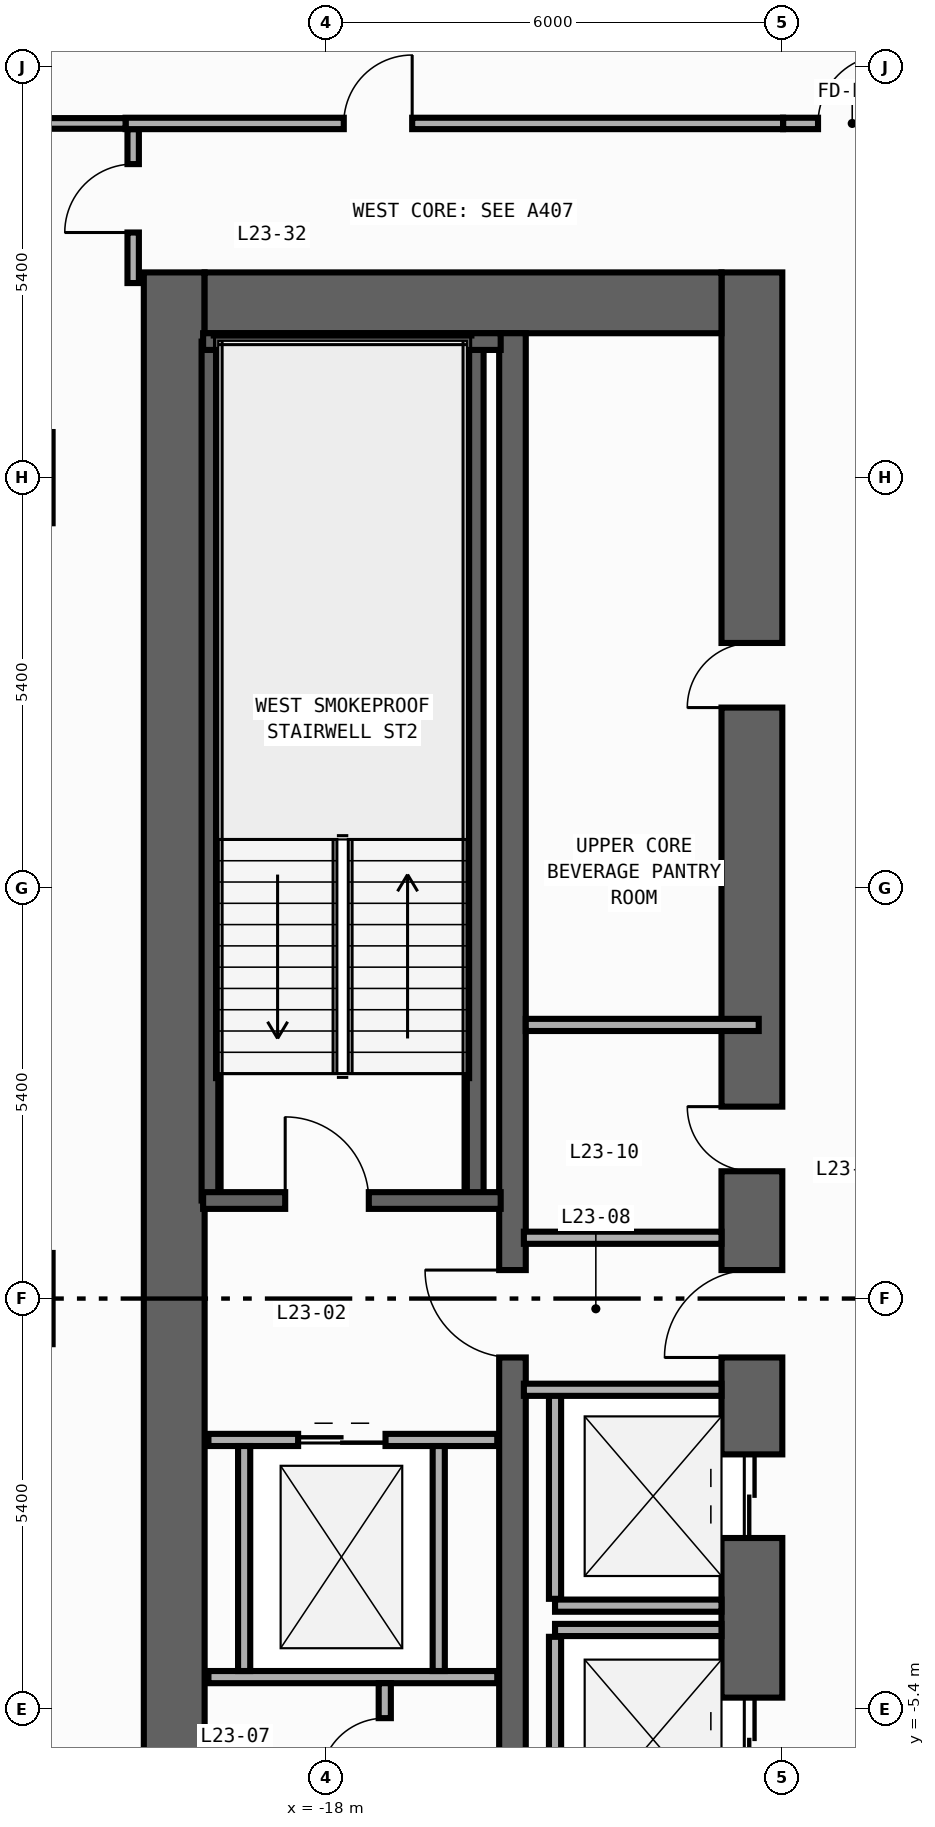
"""IFC4 building model, lengths in metres.
Left out: names, types, materials, properties, quantities, classifications, styles, units other than length and angle.
Written with IfcOpenShell. Run it as: python <this file> out.ifc"""

import sys

from ifc_helpers import new_model, si_unit, direction, frame, frame_2d, origin, origin_2d, place, context, subcontext, project, spatial, rectangle, extrude, element, fill, save


model = new_model("IFC4")
c1 = context("Model", 3, precision=1e-05, world=origin(), true_north=direction((0.0, 1.0)))
c2 = subcontext(c1, "Body", "Model", "MODEL_VIEW")
j1 = project(units=[si_unit("LENGTHUNIT", "METRE"), si_unit("PLANEANGLEUNIT", "RADIAN")], contexts=[c1])
p1 = place(None, origin())
s1 = spatial("IfcSite", under=j1, at=p1, CompositionType="ELEMENT")
p2 = place(p1, origin())
s2 = spatial("IfcBuilding", under=s1, at=p2, CompositionType="ELEMENT")
p3 = place(p2, frame((0.0, 0.0, 101.6)))
s3 = spatial("IfcBuildingStorey", under=s2, at=p3, CompositionType="ELEMENT", Elevation=101.6)
p4 = place(p3, frame((-20.0, -13.5, 0.0), z_axis=(0.0, 0.0, 1.0), x_axis=(0.0, 1.0, 0.0)))
e1 = element("IfcWall", 1, at=p4, inside=s3, PredefinedType="SHEAR", context=c2, shape_type="SweptSolid", body=[
    extrude(rectangle(XDim=27.0, YDim=0.8, at=frame_2d((13.5, 0.0))), origin(), (0.0, 0.0, 1.0), 3.94),
])
p5 = place(p3, frame((-12.4, -13.5, 0.0), z_axis=(0.0, 0.0, 1.0), x_axis=(0.0, 1.0, 0.0)))
e2 = element("IfcWall", 2, at=p5, inside=s3, PredefinedType="SHEAR", context=c2, shape_type="SweptSolid", body=[
    extrude(rectangle(XDim=27.0, YDim=0.8, at=frame_2d((13.5, 0.0))), origin(), (0.0, 0.0, 1.0), 3.94),
])
p6 = place(p5, frame((10.35, 0.0, 0.0)))
e3 = element("IfcOpeningElement", 3, at=p6, cuts=e2, PredefinedType="OPENING", context=c2, shape_type="SweptSolid", body=[
    extrude(rectangle(XDim=1.1, YDim=2.2, at=frame_2d((0.55, 1.1))), frame((0.0, 0.41, 0.0), z_axis=(0.0, -1.0, 0.0), x_axis=(1.0, 0.0, 0.0)), (0.0, 0.0, 1.0), 0.82),
])
p7 = place(p5, frame((7.15, 0.0, 0.0)))
e4 = element("IfcOpeningElement", 4, at=p7, cuts=e2, PredefinedType="OPENING", context=c2, shape_type="SweptSolid", body=[
    extrude(rectangle(XDim=1.1, YDim=2.2, at=frame_2d((0.55, 1.1))), frame((0.0, 0.41, 0.0), z_axis=(0.0, -1.0, 0.0), x_axis=(1.0, 0.0, 0.0)), (0.0, 0.0, 1.0), 0.82),
])
p8 = place(p5, frame((3.95, 0.0, 0.0)))
e5 = element("IfcOpeningElement", 5, at=p8, cuts=e2, PredefinedType="OPENING", context=c2, shape_type="SweptSolid", body=[
    extrude(rectangle(XDim=1.1, YDim=2.2, at=frame_2d((0.55, 1.1))), frame((0.0, 0.41, 0.0), z_axis=(0.0, -1.0, 0.0), x_axis=(1.0, 0.0, 0.0)), (0.0, 0.0, 1.0), 0.82),
])
p9 = place(p5, frame((15.175, 0.0, 0.0)))
e6 = element("IfcOpeningElement", 6, at=p9, cuts=e2, PredefinedType="OPENING", context=c2, shape_type="SweptSolid", body=[
    extrude(rectangle(XDim=0.85, YDim=2.1, at=frame_2d((0.425, 1.05))), frame((0.0, 0.41, 0.0), z_axis=(0.0, -1.0, 0.0), x_axis=(1.0, 0.0, 0.0)), (0.0, 0.0, 1.0), 0.82),
])
p10 = place(p5, frame((21.275, 0.0, 0.0)))
e7 = element("IfcOpeningElement", 7, at=p10, cuts=e2, PredefinedType="OPENING", context=c2, shape_type="SweptSolid", body=[
    extrude(rectangle(XDim=0.85, YDim=2.1, at=frame_2d((0.425, 1.05))), frame((0.0, 0.41, 0.0), z_axis=(0.0, -1.0, 0.0), x_axis=(1.0, 0.0, 0.0)), (0.0, 0.0, 1.0), 0.82),
])
p11 = place(p5, frame((12.725, 0.0, 0.0)))
e8 = element("IfcOpeningElement", 8, at=p11, cuts=e2, PredefinedType="OPENING", context=c2, shape_type="SweptSolid", body=[
    extrude(rectangle(XDim=1.15, YDim=2.2, at=frame_2d((0.575, 1.1))), frame((0.0, 0.41, 0.0), z_axis=(0.0, -1.0, 0.0), x_axis=(1.0, 0.0, 0.0)), (0.0, 0.0, 1.0), 0.82),
])
p12 = place(p5, frame((1.625, 0.0, 0.0)))
e9 = element("IfcOpeningElement", 9, at=p12, cuts=e2, PredefinedType="OPENING", context=c2, shape_type="SweptSolid", body=[
    extrude(rectangle(XDim=0.85, YDim=2.1, at=frame_2d((0.425, 1.05))), frame((0.0, 0.41, 0.0), z_axis=(0.0, -1.0, 0.0), x_axis=(1.0, 0.0, 0.0)), (0.0, 0.0, 1.0), 0.82),
])
p13 = place(p3, frame((-19.6, 13.1, 0.0), z_axis=(0.0, 0.0, 1.0), x_axis=(1.0, 0.0, 0.0)))
e10 = element("IfcWall", 10, at=p13, inside=s3, PredefinedType="SHEAR", context=c2, shape_type="SweptSolid", body=[
    extrude(rectangle(XDim=6.8, YDim=0.8, at=frame_2d((3.4, 0.0))), origin(), (0.0, 0.0, 1.0), 3.94),
])
p14 = place(p3, frame((-15.55, -12.7, 0.0), z_axis=(0.0, 0.0, 1.0), x_axis=(0.0, 1.0, 0.0)))
e11 = element("IfcWall", 11, at=p14, inside=s3, PredefinedType="SHEAR", context=c2, shape_type="SweptSolid", body=[
    extrude(rectangle(XDim=25.4, YDim=0.35, at=frame_2d((12.7, 0.0))), origin(), (0.0, 0.0, 1.0), 3.94),
])
p15 = place(p14, frame((11.925, 0.0, 0.0)))
e12 = element("IfcOpeningElement", 12, at=p15, cuts=e11, PredefinedType="OPENING", context=c2, shape_type="SweptSolid", body=[
    extrude(rectangle(XDim=1.15, YDim=2.2, at=frame_2d((0.575, 1.1))), frame((0.0, 0.185, 0.0), z_axis=(0.0, -1.0, 0.0), x_axis=(1.0, 0.0, 0.0)), (0.0, 0.0, 1.0), 0.37),
])
p16 = place(p14, frame((0.825, 0.0, 0.0)))
e13 = element("IfcOpeningElement", 13, at=p16, cuts=e11, PredefinedType="OPENING", context=c2, shape_type="SweptSolid", body=[
    extrude(rectangle(XDim=0.85, YDim=2.1, at=frame_2d((0.425, 1.05))), frame((0.0, 0.185, 0.0), z_axis=(0.0, -1.0, 0.0), x_axis=(1.0, 0.0, 0.0)), (0.0, 0.0, 1.0), 0.37),
])
for number, where, z_axis, x_axis in (
    (14, (-16.04, 1.29, 0.0), (0.0, 0.0, 1.0), (0.0, 1.0, 0.0)),
    (15, (-19.53, 1.29, 0.0), (0.0, 0.0, 1.0), (0.0, 1.0, 0.0)),
):
    element("IfcWall", number, at=place(p3, frame(where, z_axis=z_axis, x_axis=x_axis)), inside=s3, PredefinedType="SHEAR", context=c2, shape_type="SweptSolid", body=[
        extrude(rectangle(XDim=11.3, YDim=0.22, at=frame_2d((5.65, 0.0))), origin(), (0.0, 0.0, 1.0), 3.94),
    ])
p17 = place(p3, frame((-19.62, 12.59, 0.0), z_axis=(0.0, 0.0, 1.0), x_axis=(1.0, 0.0, 0.0)))
e16 = element("IfcWall", 16, at=p17, inside=s3, PredefinedType="SHEAR", context=c2, shape_type="SweptSolid", body=[
    extrude(rectangle(XDim=3.915, YDim=0.22, at=frame_2d((1.958, 0.0))), origin(), (0.0, 0.0, 1.0), 3.94),
])
p18 = place(p3, frame((-19.62, 1.29, 0.0), z_axis=(0.0, 0.0, 1.0), x_axis=(1.0, 0.0, 0.0)))
e17 = element("IfcWall", 17, at=p18, inside=s3, PredefinedType="SHEAR", context=c2, shape_type="SweptSolid", body=[
    extrude(rectangle(XDim=3.915, YDim=0.22, at=frame_2d((1.958, 0.0))), origin(), (0.0, 0.0, 1.0), 3.94),
])
p19 = place(p18, frame((1.08, 0.0, 0.0)))
e18 = element("IfcOpeningElement", 18, at=p19, cuts=e17, PredefinedType="OPENING", context=c2, shape_type="SweptSolid", body=[
    extrude(rectangle(XDim=1.1, YDim=2.2, at=frame_2d((0.55, 1.1))), frame((0.0, 0.12, 0.0), z_axis=(0.0, -1.0, 0.0), x_axis=(1.0, 0.0, 0.0)), (0.0, 0.0, 1.0), 0.24),
])
for number, where, z_axis, x_axis in (
    (19, (-22.2, 0.0, 0.0), (0.0, 0.0, 1.0), (1.0, 0.0, 0.0)),
    (20, (-22.2, 10.8, 0.0), (0.0, 0.0, 1.0), (1.0, 0.0, 0.0)),
):
    element("IfcColumn", number, at=place(p3, frame(where, z_axis=z_axis, x_axis=x_axis)), inside=s3, PredefinedType="COLUMN", context=c2, shape_type="SweptSolid", body=[
        extrude(rectangle(XDim=1.2, YDim=1.2, at=origin_2d()), origin(), (0.0, 0.0, 1.0), 4.2),
    ])
p20 = place(p3, frame((-14.99, -4.04, 0.0), z_axis=(0.0, 0.0, 1.0), x_axis=(1.0, 0.0, 0.0)))
e21 = element("IfcWall", 21, at=p20, inside=s3, PredefinedType="STANDARD", context=c2, shape_type="SweptSolid", body=[
    extrude(rectangle(XDim=2.19, YDim=0.16, at=frame_2d((1.095, 0.0))), origin(), (0.0, 0.0, 1.0), 3.94),
])
p21 = place(p3, frame((-14.99, -3.95, 0.0), z_axis=(0.0, 0.0, 1.0), x_axis=(0.0, 1.0, 0.0)))
e22 = element("IfcWall", 22, at=p21, inside=s3, PredefinedType="STANDARD", context=c2, shape_type="SweptSolid", body=[
    extrude(rectangle(XDim=2.7, YDim=0.16, at=frame_2d((1.35, 0.0))), origin(), (0.0, 0.0, 1.0), 3.94),
])
p22 = place(p3, frame((-14.99, -4.36, 0.0), z_axis=(0.0, 0.0, 1.0), x_axis=(1.0, 0.0, 0.0)))
e23 = element("IfcWall", 23, at=p22, inside=s3, PredefinedType="STANDARD", context=c2, shape_type="SweptSolid", body=[
    extrude(rectangle(XDim=2.19, YDim=0.16, at=frame_2d((1.095, 0.0))), origin(), (0.0, 0.0, 1.0), 3.94),
])
p23 = place(p3, frame((-14.99, -7.15, 0.0), z_axis=(0.0, 0.0, 1.0), x_axis=(0.0, 1.0, 0.0)))
e24 = element("IfcWall", 24, at=p23, inside=s3, PredefinedType="STANDARD", context=c2, shape_type="SweptSolid", body=[
    extrude(rectangle(XDim=2.7, YDim=0.16, at=frame_2d((1.35, 0.0))), origin(), (0.0, 0.0, 1.0), 3.94),
])
p24 = place(p3, frame((-19.55, -1.86, 0.0), z_axis=(0.0, 0.0, 1.0), x_axis=(1.0, 0.0, 0.0)))
e25 = element("IfcWall", 25, at=p24, inside=s3, PredefinedType="STANDARD", context=c2, shape_type="SweptSolid", body=[
    extrude(rectangle(XDim=3.8, YDim=0.16, at=frame_2d((1.9, 0.0))), origin(), (0.0, 0.0, 1.0), 3.94),
])
p25 = place(p24, frame((1.18, 0.0, 0.0)))
e26 = element("IfcOpeningElement", 26, at=p25, cuts=e25, PredefinedType="OPENING", context=c2, shape_type="SweptSolid", body=[
    extrude(rectangle(XDim=1.15, YDim=2.2, at=frame_2d((0.575, 1.1))), frame((0.0, 0.09, 0.0), z_axis=(0.0, -1.0, 0.0), x_axis=(1.0, 0.0, 0.0)), (0.0, 0.0, 1.0), 0.18),
])
p26 = place(p3, frame((-19.55, -4.98, 0.0), z_axis=(0.0, 0.0, 1.0), x_axis=(1.0, 0.0, 0.0)))
e27 = element("IfcWall", 27, at=p26, inside=s3, PredefinedType="STANDARD", context=c2, shape_type="SweptSolid", body=[
    extrude(rectangle(XDim=3.8, YDim=0.16, at=frame_2d((1.9, 0.0))), origin(), (0.0, 0.0, 1.0), 3.94),
])
for number, where, z_axis, x_axis in (
    (28, (-19.08, -4.9, 0.0), (0.0, 0.0, 1.0), (0.0, 1.0, 0.0)),
    (29, (-16.52, -4.9, 0.0), (0.0, 0.0, 1.0), (0.0, 1.0, 0.0)),
):
    element("IfcWall", number, at=place(p3, frame(where, z_axis=z_axis, x_axis=x_axis)), inside=s3, PredefinedType="STANDARD", context=c2, shape_type="SweptSolid", body=[
        extrude(rectangle(XDim=2.96, YDim=0.16, at=frame_2d((1.48, 0.0))), origin(), (0.0, 0.0, 1.0), 3.94),
    ])
for number, where, z_axis, x_axis in (
    (30, (-15.4, 0.8, 0.0), (0.0, 0.0, 1.0), (1.0, 0.0, 0.0)),
    (31, (-15.4, -1.2, 0.0), (0.0, 0.0, 1.0), (1.0, 0.0, 0.0)),
):
    element("IfcWall", number, at=place(p3, frame(where, z_axis=z_axis, x_axis=x_axis)), inside=s3, PredefinedType="STANDARD", context=c2, shape_type="SweptSolid", body=[
        extrude(rectangle(XDim=2.6, YDim=0.16, at=frame_2d((1.3, 0.0))), origin(), (0.0, 0.0, 1.0), 3.94),
    ])
p27 = place(p3, frame((-17.23, -7.67, 0.0), z_axis=(0.0, 0.0, 1.0), x_axis=(0.0, 1.0, 0.0)))
e32 = element("IfcWall", 32, at=p27, inside=s3, PredefinedType="PARTITIONING", context=c2, shape_type="SweptSolid", body=[
    extrude(rectangle(XDim=2.61, YDim=0.16, at=frame_2d((1.305, 0.0))), origin(), (0.0, 0.0, 1.0), 3.94),
])
p28 = place(p27, frame((1.3, 0.0, 0.0)))
e33 = element("IfcOpeningElement", 33, at=p28, cuts=e32, PredefinedType="OPENING", context=c2, shape_type="SweptSolid", body=[
    extrude(rectangle(XDim=0.85, YDim=2.1, at=frame_2d((0.425, 1.05))), frame((0.0, 0.09, 0.0), z_axis=(0.0, -1.0, 0.0), x_axis=(1.0, 0.0, 0.0)), (0.0, 0.0, 1.0), 0.18),
])
p29 = place(p3, frame((-15.375, 3.6, 0.0), z_axis=(0.0, 0.0, 1.0), x_axis=(1.0, 0.0, 0.0)))
e34 = element("IfcWall", 34, at=p29, inside=s3, PredefinedType="PARTITIONING", context=c2, shape_type="SweptSolid", body=[
    extrude(rectangle(XDim=3.065, YDim=0.16, at=frame_2d((1.532, 0.0))), origin(), (0.0, 0.0, 1.0), 3.94),
])
p30 = place(p3, frame((-11.99, 15.46, 0.0), z_axis=(0.0, 0.0, 1.0), x_axis=(1.0, 0.0, 0.0)))
e35 = element("IfcWall", 35, at=p30, inside=s3, PredefinedType="PARTITIONING", context=c2, shape_type="SweptSolid", body=[
    extrude(rectangle(XDim=1.98, YDim=0.15, at=frame_2d((0.99, 0.0))), origin(), (0.0, 0.0, 1.0), 3.94),
])
p31 = place(p30, frame((0.46, 0.0, 0.0)))
e36 = element("IfcOpeningElement", 36, at=p31, cuts=e35, PredefinedType="OPENING", context=c2, shape_type="SweptSolid", body=[
    extrude(rectangle(XDim=0.9, YDim=2.15, at=frame_2d((0.45, 1.075))), frame((0.0, 0.085, 0.0), z_axis=(0.0, -1.0, 0.0), x_axis=(1.0, 0.0, 0.0)), (0.0, 0.0, 1.0), 0.17),
])
p32 = place(p3, frame((-20.54, 13.36, 0.0), z_axis=(0.0, 0.0, 1.0), x_axis=(0.0, 1.0, 0.0)))
e37 = element("IfcWall", 37, at=p32, inside=s3, PredefinedType="PARTITIONING", context=c2, shape_type="SweptSolid", body=[
    extrude(rectangle(XDim=2.025, YDim=0.15, at=frame_2d((1.012, 0.0))), origin(), (0.0, 0.0, 1.0), 3.94),
])
p33 = place(p32, frame((0.665, 0.0, 0.0)))
e38 = element("IfcOpeningElement", 38, at=p33, cuts=e37, PredefinedType="OPENING", context=c2, shape_type="SweptSolid", body=[
    extrude(rectangle(XDim=0.9, YDim=2.15, at=frame_2d((0.45, 1.075))), frame((0.0, 0.085, 0.0), z_axis=(0.0, -1.0, 0.0), x_axis=(1.0, 0.0, 0.0)), (0.0, 0.0, 1.0), 0.17),
])
p34 = place(p3, frame((-20.64, 15.46, 0.0), z_axis=(0.0, 0.0, 1.0), x_axis=(1.0, 0.0, 0.0)))
e39 = element("IfcWall", 39, at=p34, inside=s3, PredefinedType="PARTITIONING", context=c2, shape_type="SweptSolid", body=[
    extrude(rectangle(XDim=8.65, YDim=0.15, at=frame_2d((4.325, 0.0))), origin(), (0.0, 0.0, 1.0), 3.94),
])
p35 = place(p34, frame((2.871, 0.0, 0.0)))
e40 = element("IfcOpeningElement", 40, at=p35, cuts=e39, PredefinedType="OPENING", context=c2, shape_type="SweptSolid", body=[
    extrude(rectangle(XDim=0.9, YDim=2.15, at=frame_2d((0.45, 1.075))), frame((0.0, 0.085, 0.0), z_axis=(0.0, -1.0, 0.0), x_axis=(1.0, 0.0, 0.0)), (0.0, 0.0, 1.0), 0.17),
])
p36 = place(p3, frame((-23.455, 15.46, 0.0), z_axis=(0.0, 0.0, 1.0), x_axis=(1.0, 0.0, 0.0)))
e41 = element("IfcWall", 41, at=p36, inside=s3, PredefinedType="PARTITIONING", context=c2, shape_type="SweptSolid", body=[
    extrude(rectangle(XDim=2.815, YDim=0.14, at=frame_2d((1.408, 0.0))), origin(), (0.0, 0.0, 1.0), 3.94),
])
p37 = place(p19, origin())
e42 = element("IfcDoor", 42, at=p37, inside=s3, OperationType="SINGLE_SWING_LEFT", PredefinedType="DOOR", context=c2, shape_type="SweptSolid", body=[
    extrude(rectangle(XDim=1.1, YDim=2.2, at=frame_2d((0.55, 1.1))), frame((0.0, 0.025, 0.0), z_axis=(0.0, -1.0, 0.0), x_axis=(1.0, 0.0, 0.0)), (0.0, 0.0, 1.0), 0.05),
])
fill(e18, e42)
p38 = place(p6, origin())
e43 = element("IfcDoor", 43, at=p38, inside=s3, OperationType="DOUBLE_DOOR_SLIDING", PredefinedType="DOOR", context=c2, shape_type="SweptSolid", body=[
    extrude(rectangle(XDim=1.1, YDim=2.2, at=frame_2d((0.55, 1.1))), frame((0.0, 0.025, 0.0), z_axis=(0.0, -1.0, 0.0), x_axis=(1.0, 0.0, 0.0)), (0.0, 0.0, 1.0), 0.05),
])
fill(e3, e43)
p39 = place(p7, origin())
e44 = element("IfcDoor", 44, at=p39, inside=s3, OperationType="DOUBLE_DOOR_SLIDING", PredefinedType="DOOR", context=c2, shape_type="SweptSolid", body=[
    extrude(rectangle(XDim=1.1, YDim=2.2, at=frame_2d((0.55, 1.1))), frame((0.0, 0.025, 0.0), z_axis=(0.0, -1.0, 0.0), x_axis=(1.0, 0.0, 0.0)), (0.0, 0.0, 1.0), 0.05),
])
fill(e4, e44)
p40 = place(p9, origin())
e45 = element("IfcDoor", 45, at=p40, inside=s3, OperationType="SINGLE_SWING_RIGHT", PredefinedType="DOOR", context=c2, shape_type="SweptSolid", body=[
    extrude(rectangle(XDim=0.85, YDim=2.1, at=frame_2d((0.425, 1.05))), frame((0.0, 0.025, 0.0), z_axis=(0.0, -1.0, 0.0), x_axis=(1.0, 0.0, 0.0)), (0.0, 0.0, 1.0), 0.05),
])
fill(e6, e45)
p41 = place(p10, origin())
e46 = element("IfcDoor", 46, at=p41, inside=s3, OperationType="SINGLE_SWING_LEFT", PredefinedType="DOOR", context=c2, shape_type="SweptSolid", body=[
    extrude(rectangle(XDim=0.85, YDim=2.1, at=frame_2d((0.425, 1.05))), frame((0.0, 0.025, 0.0), z_axis=(0.0, -1.0, 0.0), x_axis=(1.0, 0.0, 0.0)), (0.0, 0.0, 1.0), 0.05),
])
fill(e7, e46)
p42 = place(p11, origin())
e47 = element("IfcDoor", 47, at=p42, inside=s3, OperationType="SINGLE_SWING_LEFT", PredefinedType="DOOR", context=c2, shape_type="SweptSolid", body=[
    extrude(rectangle(XDim=1.15, YDim=2.2, at=frame_2d((0.575, 1.1))), frame((0.0, 0.025, 0.0), z_axis=(0.0, -1.0, 0.0), x_axis=(1.0, 0.0, 0.0)), (0.0, 0.0, 1.0), 0.05),
])
fill(e8, e47)
p43 = place(p15, origin())
e48 = element("IfcDoor", 48, at=p43, inside=s3, OperationType="SINGLE_SWING_RIGHT", PredefinedType="DOOR", context=c2, shape_type="SweptSolid", body=[
    extrude(rectangle(XDim=1.15, YDim=2.2, at=frame_2d((0.575, 1.1))), frame((0.0, 0.025, 0.0), z_axis=(0.0, -1.0, 0.0), x_axis=(1.0, 0.0, 0.0)), (0.0, 0.0, 1.0), 0.05),
])
fill(e12, e48)
p44 = place(p25, origin())
e49 = element("IfcDoor", 49, at=p44, inside=s3, OperationType="DOUBLE_DOOR_SLIDING", PredefinedType="DOOR", context=c2, shape_type="SweptSolid", body=[
    extrude(rectangle(XDim=1.15, YDim=2.2, at=frame_2d((0.575, 1.1))), frame((0.0, 0.025, 0.0), z_axis=(0.0, -1.0, 0.0), x_axis=(1.0, 0.0, 0.0)), (0.0, 0.0, 1.0), 0.05),
])
fill(e26, e49)
p45 = place(p28, origin())
e50 = element("IfcDoor", 50, at=p45, inside=s3, OperationType="SINGLE_SWING_LEFT", PredefinedType="DOOR", context=c2, shape_type="SweptSolid", body=[
    extrude(rectangle(XDim=0.85, YDim=2.1, at=frame_2d((0.425, 1.05))), frame((0.0, 0.025, 0.0), z_axis=(0.0, -1.0, 0.0), x_axis=(1.0, 0.0, 0.0)), (0.0, 0.0, 1.0), 0.05),
])
fill(e33, e50)
p46 = place(p31, origin())
e51 = element("IfcDoor", 51, at=p46, inside=s3, OperationType="SINGLE_SWING_RIGHT", PredefinedType="DOOR", context=c2, shape_type="SweptSolid", body=[
    extrude(rectangle(XDim=0.9, YDim=2.15, at=frame_2d((0.45, 1.075))), frame((0.0, 0.025, 0.0), z_axis=(0.0, -1.0, 0.0), x_axis=(1.0, 0.0, 0.0)), (0.0, 0.0, 1.0), 0.05),
])
fill(e36, e51)
p47 = place(p33, origin())
e52 = element("IfcDoor", 52, at=p47, inside=s3, OperationType="SINGLE_SWING_LEFT", PredefinedType="DOOR", context=c2, shape_type="SweptSolid", body=[
    extrude(rectangle(XDim=0.9, YDim=2.15, at=frame_2d((0.45, 1.075))), frame((0.0, 0.025, 0.0), z_axis=(0.0, -1.0, 0.0), x_axis=(1.0, 0.0, 0.0)), (0.0, 0.0, 1.0), 0.05),
])
fill(e38, e52)
p48 = place(p35, origin())
e53 = element("IfcDoor", 53, at=p48, inside=s3, OperationType="SINGLE_SWING_RIGHT", PredefinedType="DOOR", context=c2, shape_type="SweptSolid", body=[
    extrude(rectangle(XDim=0.9, YDim=2.15, at=frame_2d((0.45, 1.075))), frame((0.0, 0.025, 0.0), z_axis=(0.0, -1.0, 0.0), x_axis=(1.0, 0.0, 0.0)), (0.0, 0.0, 1.0), 0.05),
])
fill(e40, e53)
save(model, sys.argv[1])
